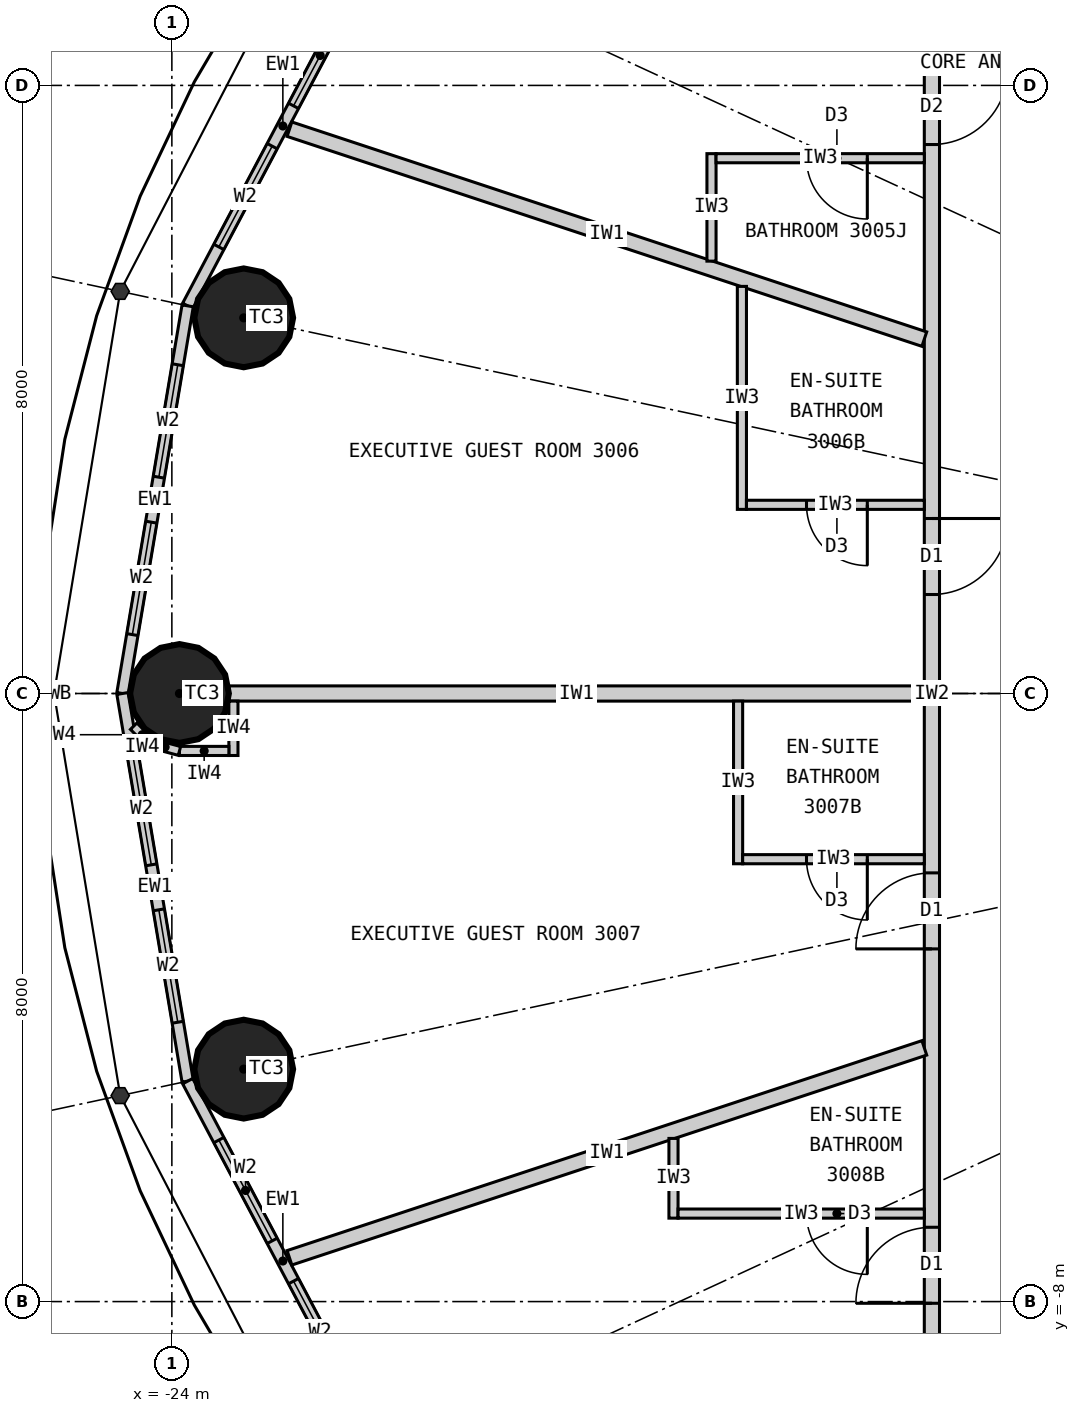
"""IFC4 building model, lengths in metres.
Left out: names, types, materials, properties, quantities, classifications, styles, units other than length and angle.
Written with IfcOpenShell. Run it as: python <this file> out.ifc"""

import sys

from ifc_helpers import new_model, si_unit, direction, frame, frame_2d, origin, origin_2d, place, context, subcontext, project, spatial, rectangle, circle, extrude, element, fill, save


model = new_model("IFC4")
c1 = context("Model", 3, precision=1e-05, world=origin(), true_north=direction((0.0, 1.0)))
c2 = subcontext(c1, "Body", "Model", "MODEL_VIEW")
j1 = project(units=[si_unit("LENGTHUNIT", "METRE"), si_unit("PLANEANGLEUNIT", "RADIAN")], contexts=[c1])
p1 = place(None, origin())
s1 = spatial("IfcSite", under=j1, at=p1, CompositionType="ELEMENT")
p2 = place(p1, origin())
s2 = spatial("IfcBuilding", under=s1, at=p2, CompositionType="ELEMENT")
p3 = place(p2, frame((0.0, 0.0, 118.8)))
s3 = spatial("IfcBuildingStorey", under=s2, at=p3, CompositionType="ELEMENT", Elevation=118.8)
for number, where, z_axis, x_axis in (
    (1, (-23.055, 4.942, 0.0), (0.0, 0.0, 1.0), (1.0, 0.0, 0.0)),
    (2, (-23.9, 0.0, 0.0), (0.0, 0.0, 1.0), (1.0, 0.0, 0.0)),
    (3, (-23.055, -4.942, 0.0), (0.0, 0.0, 1.0), (1.0, 0.0, 0.0)),
):
    element("IfcColumn", number, at=place(p3, frame(where, z_axis=z_axis, x_axis=x_axis)), inside=s3, PredefinedType="COLUMN", context=c2, shape_type="SweptSolid", body=[
        extrude(circle(Radius=0.65, at=origin_2d()), origin(), (0.0, 0.0, 1.0), 3.3),
    ])
p4 = place(p3, frame((-21.287, 9.832, 0.0), z_axis=(0.0, 0.0, 1.0), x_axis=(-0.467814388454, -0.883826735257, 0.0)))
e4 = element("IfcWall", 4, at=p4, inside=s3, PredefinedType="ELEMENTEDWALL", context=c2, shape_type="SweptSolid", body=[
    extrude(rectangle(XDim=5.354, YDim=0.15, at=frame_2d((2.677, 0.0))), origin(), (0.0, 0.0, 1.0), 3.12),
])
p5 = place(p4, frame((0.877, 0.0, 0.9)))
e5 = element("IfcOpeningElement", 5, at=p5, cuts=e4, PredefinedType="OPENING", context=c2, shape_type="SweptSolid", body=[
    extrude(rectangle(XDim=1.5, YDim=1.9, at=frame_2d((0.75, 0.95))), frame((0.0, 0.085, 0.0), z_axis=(0.0, -1.0, 0.0), x_axis=(1.0, 0.0, 0.0)), (0.0, 0.0, 1.0), 0.17),
])
p6 = place(p4, frame((2.977, 0.0, 0.9)))
e6 = element("IfcOpeningElement", 6, at=p6, cuts=e4, PredefinedType="OPENING", context=c2, shape_type="SweptSolid", body=[
    extrude(rectangle(XDim=1.5, YDim=1.9, at=frame_2d((0.75, 0.95))), frame((0.0, 0.085, 0.0), z_axis=(0.0, -1.0, 0.0), x_axis=(1.0, 0.0, 0.0)), (0.0, 0.0, 1.0), 0.17),
])
p7 = place(p3, frame((-23.792, 5.1, 0.0), z_axis=(0.0, 0.0, 1.0), x_axis=(-0.165883894218, -0.986145290329, 0.0)))
e7 = element("IfcWall", 7, at=p7, inside=s3, PredefinedType="ELEMENTEDWALL", context=c2, shape_type="SweptSolid", body=[
    extrude(rectangle(XDim=5.172, YDim=0.15, at=frame_2d((2.586, 0.0))), origin(), (0.0, 0.0, 1.0), 3.12),
])
p8 = place(p7, frame((0.786, 0.0, 0.9)))
e8 = element("IfcOpeningElement", 8, at=p8, cuts=e7, PredefinedType="OPENING", context=c2, shape_type="SweptSolid", body=[
    extrude(rectangle(XDim=1.5, YDim=1.9, at=frame_2d((0.75, 0.95))), frame((0.0, 0.085, 0.0), z_axis=(0.0, -1.0, 0.0), x_axis=(1.0, 0.0, 0.0)), (0.0, 0.0, 1.0), 0.17),
])
p9 = place(p7, frame((2.886, 0.0, 0.9)))
e9 = element("IfcOpeningElement", 9, at=p9, cuts=e7, PredefinedType="OPENING", context=c2, shape_type="SweptSolid", body=[
    extrude(rectangle(XDim=1.5, YDim=1.9, at=frame_2d((0.75, 0.95))), frame((0.0, 0.085, 0.0), z_axis=(0.0, -1.0, 0.0), x_axis=(1.0, 0.0, 0.0)), (0.0, 0.0, 1.0), 0.17),
])
p10 = place(p3, frame((-24.65, 0.0, 0.0), z_axis=(0.0, 0.0, 1.0), x_axis=(0.165883894218, -0.986145290329, 0.0)))
e10 = element("IfcWall", 10, at=p10, inside=s3, PredefinedType="ELEMENTEDWALL", context=c2, shape_type="SweptSolid", body=[
    extrude(rectangle(XDim=5.172, YDim=0.15, at=frame_2d((2.586, 0.0))), origin(), (0.0, 0.0, 1.0), 3.12),
])
p11 = place(p10, frame((0.786, 0.0, 0.9)))
e11 = element("IfcOpeningElement", 11, at=p11, cuts=e10, PredefinedType="OPENING", context=c2, shape_type="SweptSolid", body=[
    extrude(rectangle(XDim=1.5, YDim=1.9, at=frame_2d((0.75, 0.95))), frame((0.0, 0.085, 0.0), z_axis=(0.0, -1.0, 0.0), x_axis=(1.0, 0.0, 0.0)), (0.0, 0.0, 1.0), 0.17),
])
p12 = place(p10, frame((2.886, 0.0, 0.9)))
e12 = element("IfcOpeningElement", 12, at=p12, cuts=e10, PredefinedType="OPENING", context=c2, shape_type="SweptSolid", body=[
    extrude(rectangle(XDim=1.5, YDim=1.9, at=frame_2d((0.75, 0.95))), frame((0.0, 0.085, 0.0), z_axis=(0.0, -1.0, 0.0), x_axis=(1.0, 0.0, 0.0)), (0.0, 0.0, 1.0), 0.17),
])
p13 = place(p3, frame((-23.792, -5.1, 0.0), z_axis=(0.0, 0.0, 1.0), x_axis=(0.467814388454, -0.883826735257, 0.0)))
e13 = element("IfcWall", 13, at=p13, inside=s3, PredefinedType="ELEMENTEDWALL", context=c2, shape_type="SweptSolid", body=[
    extrude(rectangle(XDim=5.354, YDim=0.15, at=frame_2d((2.677, 0.0))), origin(), (0.0, 0.0, 1.0), 3.12),
])
p14 = place(p13, frame((0.877, 0.0, 0.9)))
e14 = element("IfcOpeningElement", 14, at=p14, cuts=e13, PredefinedType="OPENING", context=c2, shape_type="SweptSolid", body=[
    extrude(rectangle(XDim=1.5, YDim=1.9, at=frame_2d((0.75, 0.95))), frame((0.0, 0.085, 0.0), z_axis=(0.0, -1.0, 0.0), x_axis=(1.0, 0.0, 0.0)), (0.0, 0.0, 1.0), 0.17),
])
p15 = place(p13, frame((2.977, 0.0, 0.9)))
e15 = element("IfcOpeningElement", 15, at=p15, cuts=e13, PredefinedType="OPENING", context=c2, shape_type="SweptSolid", body=[
    extrude(rectangle(XDim=1.5, YDim=1.9, at=frame_2d((0.75, 0.95))), frame((0.0, 0.085, 0.0), z_axis=(0.0, -1.0, 0.0), x_axis=(1.0, 0.0, 0.0)), (0.0, 0.0, 1.0), 0.17),
])
p16 = place(p3, frame((-14.0, 9.9, 0.0), z_axis=(0.0, 0.0, 1.0), x_axis=(0.0, -1.0, 0.0)))
e16 = element("IfcWall", 16, at=p16, inside=s3, PredefinedType="PARTITIONING", context=c2, shape_type="SweptSolid", body=[
    extrude(rectangle(XDim=19.8, YDim=0.2, at=frame_2d((9.9, 0.0))), origin(), (0.0, 0.0, 1.0), 3.12),
])
p17 = place(p16, frame((1.678, 0.0, 0.0)))
e17 = element("IfcOpeningElement", 17, at=p17, cuts=e16, PredefinedType="OPENING", context=c2, shape_type="SweptSolid", body=[
    extrude(rectangle(XDim=1.0, YDim=2.2, at=frame_2d((0.5, 1.1))), frame((0.0, 0.11, 0.0), z_axis=(0.0, -1.0, 0.0), x_axis=(1.0, 0.0, 0.0)), (0.0, 0.0, 1.0), 0.22),
])
p18 = place(p16, frame((7.598, 0.0, 0.0)))
e18 = element("IfcOpeningElement", 18, at=p18, cuts=e16, PredefinedType="OPENING", context=c2, shape_type="SweptSolid", body=[
    extrude(rectangle(XDim=1.0, YDim=2.2, at=frame_2d((0.5, 1.1))), frame((0.0, 0.11, 0.0), z_axis=(0.0, -1.0, 0.0), x_axis=(1.0, 0.0, 0.0)), (0.0, 0.0, 1.0), 0.22),
])
p19 = place(p16, frame((12.26, 0.0, 0.0)))
e19 = element("IfcOpeningElement", 19, at=p19, cuts=e16, PredefinedType="OPENING", context=c2, shape_type="SweptSolid", body=[
    extrude(rectangle(XDim=1.0, YDim=2.2, at=frame_2d((0.5, 1.1))), frame((0.0, 0.11, 0.0), z_axis=(0.0, -1.0, 0.0), x_axis=(1.0, 0.0, 0.0)), (0.0, 0.0, 1.0), 0.22),
])
p20 = place(p16, frame((16.922, 0.0, 0.0)))
e20 = element("IfcOpeningElement", 20, at=p20, cuts=e16, PredefinedType="OPENING", context=c2, shape_type="SweptSolid", body=[
    extrude(rectangle(XDim=1.0, YDim=2.2, at=frame_2d((0.5, 1.1))), frame((0.0, 0.11, 0.0), z_axis=(0.0, -1.0, 0.0), x_axis=(1.0, 0.0, 0.0)), (0.0, 0.0, 1.0), 0.22),
])
p21 = place(p3, frame((-14.1, 4.662, 0.0), z_axis=(0.0, 0.0, 1.0), x_axis=(-0.949446466373, 0.313928984789, 0.0)))
e21 = element("IfcWall", 21, at=p21, inside=s3, PredefinedType="PARTITIONING", context=c2, shape_type="SweptSolid", body=[
    extrude(rectangle(XDim=8.797, YDim=0.2, at=frame_2d((4.399, 0.0))), origin(), (0.0, 0.0, 1.0), 3.12),
])
p22 = place(p3, frame((-14.1, 0.0, 0.0), z_axis=(0.0, 0.0, 1.0), x_axis=(-1.0, 0.0, 0.0)))
e22 = element("IfcWall", 22, at=p22, inside=s3, PredefinedType="PARTITIONING", context=c2, shape_type="SweptSolid", body=[
    extrude(rectangle(XDim=9.15, YDim=0.2, at=frame_2d((4.575, 0.0))), origin(), (0.0, 0.0, 1.0), 2.32),
])
p23 = place(p3, frame((-14.1, -4.662, 0.0), z_axis=(0.0, 0.0, 1.0), x_axis=(-0.949446466373, -0.313928984789, 0.0)))
e23 = element("IfcWall", 23, at=p23, inside=s3, PredefinedType="PARTITIONING", context=c2, shape_type="SweptSolid", body=[
    extrude(rectangle(XDim=8.797, YDim=0.2, at=frame_2d((4.399, 0.0))), origin(), (0.0, 0.0, 1.0), 3.12),
])
p24 = place(p3, frame((-16.9, 5.688, 0.0), z_axis=(0.0, 0.0, 1.0), x_axis=(0.0, 1.0, 0.0)))
e24 = element("IfcWall", 24, at=p24, inside=s3, PredefinedType="PARTITIONING", context=c2, shape_type="SweptSolid", body=[
    extrude(rectangle(XDim=1.414, YDim=0.12, at=frame_2d((0.707, 0.0))), origin(), (0.0, 0.0, 1.0), 3.12),
])
p25 = place(p3, frame((-14.1, 7.042, 0.0), z_axis=(0.0, 0.0, 1.0), x_axis=(-1.0, 0.0, 0.0)))
e25 = element("IfcWall", 25, at=p25, inside=s3, PredefinedType="PARTITIONING", context=c2, shape_type="SweptSolid", body=[
    extrude(rectangle(XDim=2.74, YDim=0.12, at=frame_2d((1.37, 0.0))), origin(), (0.0, 0.0, 1.0), 3.12),
])
p26 = place(p25, frame((0.75, 0.0, 0.0)))
e26 = element("IfcOpeningElement", 26, at=p26, cuts=e25, PredefinedType="OPENING", context=c2, shape_type="SweptSolid", body=[
    extrude(rectangle(XDim=0.8, YDim=2.1, at=frame_2d((0.4, 1.05))), frame((0.0, 0.07, 0.0), z_axis=(0.0, -1.0, 0.0), x_axis=(1.0, 0.0, 0.0)), (0.0, 0.0, 1.0), 0.14),
])
p27 = place(p3, frame((-16.5, 5.356, 0.0), z_axis=(0.0, 0.0, 1.0), x_axis=(0.0, -1.0, 0.0)))
e27 = element("IfcWall", 27, at=p27, inside=s3, PredefinedType="PARTITIONING", context=c2, shape_type="SweptSolid", body=[
    extrude(rectangle(XDim=2.934, YDim=0.12, at=frame_2d((1.467, 0.0))), origin(), (0.0, 0.0, 1.0), 3.12),
])
p28 = place(p3, frame((-14.1, 2.482, 0.0), z_axis=(0.0, 0.0, 1.0), x_axis=(-1.0, 0.0, 0.0)))
e28 = element("IfcWall", 28, at=p28, inside=s3, PredefinedType="PARTITIONING", context=c2, shape_type="SweptSolid", body=[
    extrude(rectangle(XDim=2.34, YDim=0.12, at=frame_2d((1.17, 0.0))), origin(), (0.0, 0.0, 1.0), 3.12),
])
p29 = place(p28, frame((0.75, 0.0, 0.0)))
e29 = element("IfcOpeningElement", 29, at=p29, cuts=e28, PredefinedType="OPENING", context=c2, shape_type="SweptSolid", body=[
    extrude(rectangle(XDim=0.8, YDim=2.1, at=frame_2d((0.4, 1.05))), frame((0.0, 0.07, 0.0), z_axis=(0.0, -1.0, 0.0), x_axis=(1.0, 0.0, 0.0)), (0.0, 0.0, 1.0), 0.14),
])
p30 = place(p3, frame((-16.55, -0.1, 0.0), z_axis=(0.0, 0.0, 1.0), x_axis=(0.0, -1.0, 0.0)))
e30 = element("IfcWall", 30, at=p30, inside=s3, PredefinedType="PARTITIONING", context=c2, shape_type="SweptSolid", body=[
    extrude(rectangle(XDim=2.14, YDim=0.12, at=frame_2d((1.07, 0.0))), origin(), (0.0, 0.0, 1.0), 3.12),
])
p31 = place(p3, frame((-14.1, -2.18, 0.0), z_axis=(0.0, 0.0, 1.0), x_axis=(-1.0, 0.0, 0.0)))
e31 = element("IfcWall", 31, at=p31, inside=s3, PredefinedType="PARTITIONING", context=c2, shape_type="SweptSolid", body=[
    extrude(rectangle(XDim=2.39, YDim=0.12, at=frame_2d((1.195, 0.0))), origin(), (0.0, 0.0, 1.0), 3.12),
])
p32 = place(p31, frame((0.75, 0.0, 0.0)))
e32 = element("IfcOpeningElement", 32, at=p32, cuts=e31, PredefinedType="OPENING", context=c2, shape_type="SweptSolid", body=[
    extrude(rectangle(XDim=0.8, YDim=2.1, at=frame_2d((0.4, 1.05))), frame((0.0, 0.07, 0.0), z_axis=(0.0, -1.0, 0.0), x_axis=(1.0, 0.0, 0.0)), (0.0, 0.0, 1.0), 0.14),
])
p33 = place(p3, frame((-17.4, -5.854, 0.0), z_axis=(0.0, 0.0, 1.0), x_axis=(0.0, -1.0, 0.0)))
e33 = element("IfcWall", 33, at=p33, inside=s3, PredefinedType="PARTITIONING", context=c2, shape_type="SweptSolid", body=[
    extrude(rectangle(XDim=1.049, YDim=0.12, at=frame_2d((0.524, 0.0))), origin(), (0.0, 0.0, 1.0), 3.12),
])
p34 = place(p3, frame((-14.1, -6.842, 0.0), z_axis=(0.0, 0.0, 1.0), x_axis=(-1.0, 0.0, 0.0)))
e34 = element("IfcWall", 34, at=p34, inside=s3, PredefinedType="PARTITIONING", context=c2, shape_type="SweptSolid", body=[
    extrude(rectangle(XDim=3.24, YDim=0.12, at=frame_2d((1.62, 0.0))), origin(), (0.0, 0.0, 1.0), 3.12),
])
p35 = place(p34, frame((0.75, 0.0, 0.0)))
e35 = element("IfcOpeningElement", 35, at=p35, cuts=e34, PredefinedType="OPENING", context=c2, shape_type="SweptSolid", body=[
    extrude(rectangle(XDim=0.8, YDim=2.1, at=frame_2d((0.4, 1.05))), frame((0.0, 0.07, 0.0), z_axis=(0.0, -1.0, 0.0), x_axis=(1.0, 0.0, 0.0)), (0.0, 0.0, 1.0), 0.14),
])
p36 = place(p3, frame((-23.19, -0.1, 0.0), z_axis=(0.0, 0.0, 1.0), x_axis=(0.0, -1.0, 0.0)))
e36 = element("IfcWall", 36, at=p36, inside=s3, PredefinedType="PARTITIONING", context=c2, shape_type="SweptSolid", body=[
    extrude(rectangle(XDim=0.716, YDim=0.12, at=frame_2d((0.358, 0.0))), origin(), (0.0, 0.0, 1.0), 3.12),
])
p37 = place(p3, frame((-23.25, -0.756, 0.0), z_axis=(0.0, 0.0, 1.0), x_axis=(-1.0, 0.0, 0.0)))
e37 = element("IfcWall", 37, at=p37, inside=s3, PredefinedType="PARTITIONING", context=c2, shape_type="SweptSolid", body=[
    extrude(rectangle(XDim=0.65, YDim=0.12, at=frame_2d((0.325, 0.0))), origin(), (0.0, 0.0, 1.0), 3.12),
])
p38 = place(p3, frame((-23.9, -0.756, 0.0), z_axis=(0.0, 0.0, 1.0), x_axis=(-0.965892334856, 0.2589440045, 0.0)))
e38 = element("IfcWall", 38, at=p38, inside=s3, PredefinedType="PARTITIONING", context=c2, shape_type="SweptSolid", body=[
    extrude(rectangle(XDim=0.391, YDim=0.12, at=frame_2d((0.196, 0.0))), origin(), (0.0, 0.0, 1.0), 3.12),
])
p39 = place(p3, frame((-24.278, -0.655, 0.0), z_axis=(0.0, 0.0, 1.0), x_axis=(-0.707106781187, 0.707106781187, 0.0)))
e39 = element("IfcWall", 39, at=p39, inside=s3, PredefinedType="PARTITIONING", context=c2, shape_type="SweptSolid", body=[
    extrude(rectangle(XDim=0.318, YDim=0.12, at=frame_2d((0.159, 0.0))), origin(), (0.0, 0.0, 1.0), 3.12),
])
p40 = place(p5, origin())
e40 = element("IfcWindow", 40, at=p40, inside=s3, PartitioningType="SINGLE_PANEL", PredefinedType="WINDOW", context=c2, shape_type="SweptSolid", body=[
    extrude(rectangle(XDim=1.5, YDim=1.9, at=frame_2d((0.75, 0.95))), frame((0.0, 0.03, 0.0), z_axis=(0.0, -1.0, 0.0), x_axis=(1.0, 0.0, 0.0)), (0.0, 0.0, 1.0), 0.06),
])
fill(e5, e40)
p41 = place(p6, origin())
e41 = element("IfcWindow", 41, at=p41, inside=s3, PartitioningType="SINGLE_PANEL", PredefinedType="WINDOW", context=c2, shape_type="SweptSolid", body=[
    extrude(rectangle(XDim=1.5, YDim=1.9, at=frame_2d((0.75, 0.95))), frame((0.0, 0.03, 0.0), z_axis=(0.0, -1.0, 0.0), x_axis=(1.0, 0.0, 0.0)), (0.0, 0.0, 1.0), 0.06),
])
fill(e6, e41)
p42 = place(p8, origin())
e42 = element("IfcWindow", 42, at=p42, inside=s3, PartitioningType="SINGLE_PANEL", PredefinedType="WINDOW", context=c2, shape_type="SweptSolid", body=[
    extrude(rectangle(XDim=1.5, YDim=1.9, at=frame_2d((0.75, 0.95))), frame((0.0, 0.03, 0.0), z_axis=(0.0, -1.0, 0.0), x_axis=(1.0, 0.0, 0.0)), (0.0, 0.0, 1.0), 0.06),
])
fill(e8, e42)
p43 = place(p9, origin())
e43 = element("IfcWindow", 43, at=p43, inside=s3, PartitioningType="SINGLE_PANEL", PredefinedType="WINDOW", context=c2, shape_type="SweptSolid", body=[
    extrude(rectangle(XDim=1.5, YDim=1.9, at=frame_2d((0.75, 0.95))), frame((0.0, 0.03, 0.0), z_axis=(0.0, -1.0, 0.0), x_axis=(1.0, 0.0, 0.0)), (0.0, 0.0, 1.0), 0.06),
])
fill(e9, e43)
p44 = place(p11, origin())
e44 = element("IfcWindow", 44, at=p44, inside=s3, PartitioningType="SINGLE_PANEL", PredefinedType="WINDOW", context=c2, shape_type="SweptSolid", body=[
    extrude(rectangle(XDim=1.5, YDim=1.9, at=frame_2d((0.75, 0.95))), frame((0.0, 0.03, 0.0), z_axis=(0.0, -1.0, 0.0), x_axis=(1.0, 0.0, 0.0)), (0.0, 0.0, 1.0), 0.06),
])
fill(e11, e44)
p45 = place(p12, origin())
e45 = element("IfcWindow", 45, at=p45, inside=s3, PartitioningType="SINGLE_PANEL", PredefinedType="WINDOW", context=c2, shape_type="SweptSolid", body=[
    extrude(rectangle(XDim=1.5, YDim=1.9, at=frame_2d((0.75, 0.95))), frame((0.0, 0.03, 0.0), z_axis=(0.0, -1.0, 0.0), x_axis=(1.0, 0.0, 0.0)), (0.0, 0.0, 1.0), 0.06),
])
fill(e12, e45)
p46 = place(p14, origin())
e46 = element("IfcWindow", 46, at=p46, inside=s3, PartitioningType="SINGLE_PANEL", PredefinedType="WINDOW", context=c2, shape_type="SweptSolid", body=[
    extrude(rectangle(XDim=1.5, YDim=1.9, at=frame_2d((0.75, 0.95))), frame((0.0, 0.03, 0.0), z_axis=(0.0, -1.0, 0.0), x_axis=(1.0, 0.0, 0.0)), (0.0, 0.0, 1.0), 0.06),
])
fill(e14, e46)
p47 = place(p15, origin())
e47 = element("IfcWindow", 47, at=p47, inside=s3, PartitioningType="SINGLE_PANEL", PredefinedType="WINDOW", context=c2, shape_type="SweptSolid", body=[
    extrude(rectangle(XDim=1.5, YDim=1.9, at=frame_2d((0.75, 0.95))), frame((0.0, 0.03, 0.0), z_axis=(0.0, -1.0, 0.0), x_axis=(1.0, 0.0, 0.0)), (0.0, 0.0, 1.0), 0.06),
])
fill(e15, e47)
p48 = place(p26, origin())
e48 = element("IfcDoor", 48, at=p48, inside=s3, OperationType="SINGLE_SWING_LEFT", PredefinedType="DOOR", context=c2, shape_type="SweptSolid", body=[
    extrude(rectangle(XDim=0.8, YDim=2.1, at=frame_2d((0.4, 1.05))), frame((0.0, 0.025, 0.0), z_axis=(0.0, -1.0, 0.0), x_axis=(1.0, 0.0, 0.0)), (0.0, 0.0, 1.0), 0.05),
])
fill(e26, e48)
p49 = place(p17, origin())
e49 = element("IfcDoor", 49, at=p49, inside=s3, OperationType="SINGLE_SWING_LEFT", PredefinedType="DOOR", context=c2, shape_type="SweptSolid", body=[
    extrude(rectangle(XDim=1.0, YDim=2.2, at=frame_2d((0.5, 1.1))), frame((0.0, 0.025, 0.0), z_axis=(0.0, -1.0, 0.0), x_axis=(1.0, 0.0, 0.0)), (0.0, 0.0, 1.0), 0.05),
])
fill(e17, e49)
p50 = place(p29, origin())
e50 = element("IfcDoor", 50, at=p50, inside=s3, OperationType="SINGLE_SWING_LEFT", PredefinedType="DOOR", context=c2, shape_type="SweptSolid", body=[
    extrude(rectangle(XDim=0.8, YDim=2.1, at=frame_2d((0.4, 1.05))), frame((0.0, 0.025, 0.0), z_axis=(0.0, -1.0, 0.0), x_axis=(1.0, 0.0, 0.0)), (0.0, 0.0, 1.0), 0.05),
])
fill(e29, e50)
p51 = place(p18, origin())
e51 = element("IfcDoor", 51, at=p51, inside=s3, OperationType="SINGLE_SWING_LEFT", PredefinedType="DOOR", context=c2, shape_type="SweptSolid", body=[
    extrude(rectangle(XDim=1.0, YDim=2.2, at=frame_2d((0.5, 1.1))), frame((0.0, 0.025, 0.0), z_axis=(0.0, -1.0, 0.0), x_axis=(1.0, 0.0, 0.0)), (0.0, 0.0, 1.0), 0.05),
])
fill(e18, e51)
p52 = place(p32, origin())
e52 = element("IfcDoor", 52, at=p52, inside=s3, OperationType="SINGLE_SWING_LEFT", PredefinedType="DOOR", context=c2, shape_type="SweptSolid", body=[
    extrude(rectangle(XDim=0.8, YDim=2.1, at=frame_2d((0.4, 1.05))), frame((0.0, 0.025, 0.0), z_axis=(0.0, -1.0, 0.0), x_axis=(1.0, 0.0, 0.0)), (0.0, 0.0, 1.0), 0.05),
])
fill(e32, e52)
p53 = place(p19, origin())
e53 = element("IfcDoor", 53, at=p53, inside=s3, OperationType="SINGLE_SWING_RIGHT", PredefinedType="DOOR", context=c2, shape_type="SweptSolid", body=[
    extrude(rectangle(XDim=1.0, YDim=2.2, at=frame_2d((0.5, 1.1))), frame((0.0, 0.025, 0.0), z_axis=(0.0, -1.0, 0.0), x_axis=(1.0, 0.0, 0.0)), (0.0, 0.0, 1.0), 0.05),
])
fill(e19, e53)
p54 = place(p35, origin())
e54 = element("IfcDoor", 54, at=p54, inside=s3, OperationType="SINGLE_SWING_LEFT", PredefinedType="DOOR", context=c2, shape_type="SweptSolid", body=[
    extrude(rectangle(XDim=0.8, YDim=2.1, at=frame_2d((0.4, 1.05))), frame((0.0, 0.025, 0.0), z_axis=(0.0, -1.0, 0.0), x_axis=(1.0, 0.0, 0.0)), (0.0, 0.0, 1.0), 0.05),
])
fill(e35, e54)
p55 = place(p20, origin())
e55 = element("IfcDoor", 55, at=p55, inside=s3, OperationType="SINGLE_SWING_RIGHT", PredefinedType="DOOR", context=c2, shape_type="SweptSolid", body=[
    extrude(rectangle(XDim=1.0, YDim=2.2, at=frame_2d((0.5, 1.1))), frame((0.0, 0.025, 0.0), z_axis=(0.0, -1.0, 0.0), x_axis=(1.0, 0.0, 0.0)), (0.0, 0.0, 1.0), 0.05),
])
fill(e20, e55)
save(model, sys.argv[1])
